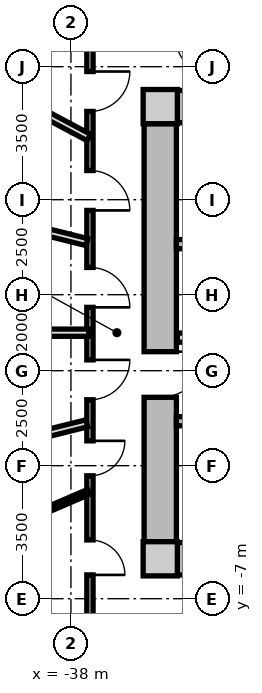
"""IFC4 building model, lengths in metres.
Left out: names, types, materials, properties, quantities, classifications, styles, units other than length and angle.
Written with IfcOpenShell. Run it as: python <this file> out.ifc"""

import sys

from ifc_helpers import new_model, si_unit, direction, frame, frame_2d, origin, origin_2d, place, context, subcontext, project, spatial, rectangle, extrude, source, transform, mapped, element, fill, save


model = new_model("IFC4")
c1 = context("Model", 3, precision=1e-05, world=origin(), true_north=direction((0.0, 1.0)))
c2 = subcontext(c1, "Body", "Model", "MODEL_VIEW")
j1 = project(units=[si_unit("LENGTHUNIT", "METRE"), si_unit("PLANEANGLEUNIT", "RADIAN")], contexts=[c1])
p1 = place(None, origin())
s1 = spatial("IfcSite", under=j1, at=p1, CompositionType="ELEMENT")
p2 = place(p1, origin())
s2 = spatial("IfcBuilding", under=s1, at=p2, CompositionType="ELEMENT")
p3 = place(p2, frame((0.0, 0.0, 36.85)))
s3 = spatial("IfcBuildingStorey", under=s2, at=p3, CompositionType="ELEMENT", Elevation=36.85)
m1 = source(origin(), c2, "Body", "SweptSolid", [
    extrude(rectangle(XDim=0.9, YDim=0.9, at=origin_2d()), origin(), (0.0, 0.0, 1.0), 3.05),
])
for number, where, z_axis, x_axis in (
    (1, (-35.65, -5.95, 0.0), (0.0, 0.0, 1.0), (1.0, 0.0, 0.0)),
    (2, (-35.65, 5.95, 0.0), (0.0, 0.0, 1.0), (1.0, 0.0, 0.0)),
):
    element("IfcColumn", number, at=place(p3, frame(where, z_axis=z_axis, x_axis=x_axis)), inside=s3, PredefinedType="COLUMN", context=c2, shape_type="MappedRepresentation", body=[
        mapped(m1, transform((0.0, 0.0, 0.0), x_axis=(1.0, 0.0, 0.0), y_axis=(0.0, 1.0, 0.0), z_axis=(0.0, 0.0, 1.0), scale=1.0)),
    ])
m2 = source(origin(), c2, "Body", "SweptSolid", [
    extrude(rectangle(XDim=14.4, YDim=0.85, at=frame_2d((7.2, 0.0))), origin(), (0.0, 0.0, 1.0), 2.79),
])
for number, where, z_axis, x_axis in (
    (3, (-35.2, 5.95, 0.0), (0.0, 0.0, 1.0), (1.0, 0.0, 0.0)),
    (4, (-20.8, -5.95, 0.0), (0.0, 0.0, 1.0), (-1.0, 0.0, 0.0)),
):
    element("IfcWall", number, at=place(p3, frame(where, z_axis=z_axis, x_axis=x_axis)), inside=s3, PredefinedType="SHEAR", context=c2, shape_type="MappedRepresentation", body=[
        mapped(m2, transform((0.0, 0.0, 0.0), x_axis=(1.0, 0.0, 0.0), y_axis=(0.0, 1.0, 0.0), z_axis=(0.0, 0.0, 1.0), scale=1.0)),
    ])
m3 = source(origin(), c2, "Body", "SweptSolid", [
    extrude(rectangle(XDim=11.0, YDim=0.85, at=frame_2d((5.5, 0.0))), origin(), (0.0, 0.0, 1.0), 2.79),
])
p4 = place(p3, frame((-35.65, -5.5, 0.0), z_axis=(0.0, 0.0, 1.0), x_axis=(0.0, 1.0, 0.0)))
e5 = element("IfcWall", 5, at=p4, inside=s3, PredefinedType="SHEAR", context=c2, shape_type="MappedRepresentation", body=[
    mapped(m3, transform((0.0, 0.0, 0.0), x_axis=(1.0, 0.0, 0.0), y_axis=(0.0, 1.0, 0.0), z_axis=(0.0, 0.0, 1.0), scale=1.0)),
])
p5 = place(p4, frame((3.8, 0.0, 0.0)))
e6 = element("IfcOpeningElement", 6, at=p5, cuts=e5, PredefinedType="OPENING", context=c2, shape_type="SweptSolid", body=[
    extrude(rectangle(XDim=1.2, YDim=2.15, at=frame_2d((0.6, 1.075))), frame((0.0, 0.435, 0.0), z_axis=(0.0, -1.0, 0.0), x_axis=(1.0, 0.0, 0.0)), (0.0, 0.0, 1.0), 0.87),
])
m4 = source(origin(), c2, "Body", "SweptSolid", [
    extrude(rectangle(XDim=7.765, YDim=0.24, at=frame_2d((3.883, 0.0))), origin(), (0.0, 0.0, 1.0), 2.79),
])
p6 = place(p3, frame((-35.225, 2.33, 0.0), z_axis=(0.0, 0.0, 1.0), x_axis=(1.0, 0.0, 0.0)))
e7 = element("IfcWall", 7, at=p6, inside=s3, PredefinedType="PARTITIONING", context=c2, shape_type="MappedRepresentation", body=[
    mapped(m4, transform((0.0, 0.0, 0.0), x_axis=(1.0, 0.0, 0.0), y_axis=(0.0, 1.0, 0.0), z_axis=(0.0, 0.0, 1.0), scale=1.0)),
])
p7 = place(p3, frame((-35.225, -2.33, 0.0), z_axis=(0.0, 0.0, 1.0), x_axis=(1.0, 0.0, 0.0)))
e8 = element("IfcWall", 8, at=p7, inside=s3, PredefinedType="PARTITIONING", context=c2, shape_type="MappedRepresentation", body=[
    mapped(m4, transform((0.0, 0.0, 0.0), x_axis=(1.0, 0.0, 0.0), y_axis=(0.0, 1.0, 0.0), z_axis=(0.0, 0.0, 1.0), scale=1.0)),
])
p8 = place(p7, frame((0.885, 0.0, 0.0)))
e9 = element("IfcOpeningElement", 9, at=p8, cuts=e8, PredefinedType="OPENING", context=c2, shape_type="SweptSolid", body=[
    extrude(rectangle(XDim=1.1, YDim=2.15, at=frame_2d((0.55, 1.075))), frame((0.0, 0.13, 0.0), z_axis=(0.0, -1.0, 0.0), x_axis=(1.0, 0.0, 0.0)), (0.0, 0.0, 1.0), 0.26),
])
m5 = source(origin(), c2, "Body", "SweptSolid", [
    extrude(rectangle(XDim=7.62, YDim=0.24, at=frame_2d((3.81, 0.0))), origin(), (0.0, 0.0, 1.0), 2.775),
])
p9 = place(p3, frame((-35.2, -0.13, 0.0), z_axis=(0.0, 0.0, 1.0), x_axis=(1.0, 0.0, 0.0)))
e10 = element("IfcWall", 10, at=p9, inside=s3, PredefinedType="PARTITIONING", context=c2, shape_type="MappedRepresentation", body=[
    mapped(m5, transform((0.0, 0.0, 0.0), x_axis=(1.0, 0.0, 0.0), y_axis=(0.0, 1.0, 0.0), z_axis=(0.0, 0.0, 1.0), scale=1.0)),
])
p10 = place(p9, frame((6.22, 0.0, 0.0)))
e11 = element("IfcOpeningElement", 11, at=p10, cuts=e10, PredefinedType="OPENING", context=c2, shape_type="SweptSolid", body=[
    extrude(rectangle(XDim=1.0, YDim=2.1, at=frame_2d((0.5, 1.05))), frame((0.0, 0.13, 0.0), z_axis=(0.0, -1.0, 0.0), x_axis=(1.0, 0.0, 0.0)), (0.0, 0.0, 1.0), 0.26),
])
p11 = place(p9, frame((0.85, 0.0, 0.0)))
e12 = element("IfcOpeningElement", 12, at=p11, cuts=e10, PredefinedType="OPENING", context=c2, shape_type="SweptSolid", body=[
    extrude(rectangle(XDim=1.1, YDim=2.2, at=frame_2d((0.55, 1.1))), frame((0.0, 0.13, 0.0), z_axis=(0.0, -1.0, 0.0), x_axis=(1.0, 0.0, 0.0)), (0.0, 0.0, 1.0), 0.26),
])
p12 = place(p9, frame((3.85, 0.0, 0.0)))
e13 = element("IfcOpeningElement", 13, at=p12, cuts=e10, PredefinedType="OPENING", context=c2, shape_type="SweptSolid", body=[
    extrude(rectangle(XDim=1.1, YDim=2.2, at=frame_2d((0.55, 1.1))), frame((0.0, 0.13, 0.0), z_axis=(0.0, -1.0, 0.0), x_axis=(1.0, 0.0, 0.0)), (0.0, 0.0, 1.0), 0.26),
])
m6 = source(origin(), c2, "Body", "SweptSolid", [
    extrude(rectangle(XDim=15.6, YDim=0.165, at=frame_2d((7.8, 0.0))), origin(), (0.0, 0.0, 1.0), 2.775),
])
p13 = place(p3, frame((-37.5, -7.8, 0.0), z_axis=(0.0, 0.0, 1.0), x_axis=(0.0, 1.0, 0.0)))
e14 = element("IfcWall", 14, at=p13, inside=s3, PredefinedType="PARTITIONING", context=c2, shape_type="MappedRepresentation", body=[
    mapped(m6, transform((0.0, 0.0, 0.0), x_axis=(1.0, 0.0, 0.0), y_axis=(0.0, 1.0, 0.0), z_axis=(0.0, 0.0, 1.0), scale=1.0)),
])
p14 = place(p13, frame((13.623, 0.0, 0.0)))
e15 = element("IfcOpeningElement", 15, at=p14, cuts=e14, PredefinedType="OPENING", context=c2, shape_type="SweptSolid", body=[
    extrude(rectangle(XDim=1.05, YDim=2.15, at=frame_2d((0.525, 1.075))), frame((0.0, 0.093, 0.0), z_axis=(0.0, -1.0, 0.0), x_axis=(1.0, 0.0, 0.0)), (0.0, 0.0, 1.0), 0.185),
])
p15 = place(p13, frame((11.018, 0.0, 0.0)))
e16 = element("IfcOpeningElement", 16, at=p15, cuts=e14, PredefinedType="OPENING", context=c2, shape_type="SweptSolid", body=[
    extrude(rectangle(XDim=1.05, YDim=2.15, at=frame_2d((0.525, 1.075))), frame((0.0, 0.093, 0.0), z_axis=(0.0, -1.0, 0.0), x_axis=(1.0, 0.0, 0.0)), (0.0, 0.0, 1.0), 0.185),
])
p16 = place(p13, frame((8.467, 0.0, 0.0)))
e17 = element("IfcOpeningElement", 17, at=p16, cuts=e14, PredefinedType="OPENING", context=c2, shape_type="SweptSolid", body=[
    extrude(rectangle(XDim=1.05, YDim=2.15, at=frame_2d((0.525, 1.075))), frame((0.0, 0.093, 0.0), z_axis=(0.0, -1.0, 0.0), x_axis=(1.0, 0.0, 0.0)), (0.0, 0.0, 1.0), 0.185),
])
p17 = place(p13, frame((6.035, 0.0, 0.0)))
e18 = element("IfcOpeningElement", 18, at=p17, cuts=e14, PredefinedType="OPENING", context=c2, shape_type="SweptSolid", body=[
    extrude(rectangle(XDim=1.05, YDim=2.15, at=frame_2d((0.525, 1.075))), frame((0.0, 0.093, 0.0), z_axis=(0.0, -1.0, 0.0), x_axis=(1.0, 0.0, 0.0)), (0.0, 0.0, 1.0), 0.185),
])
p18 = place(p13, frame((4.034, 0.0, 0.0)))
e19 = element("IfcOpeningElement", 19, at=p18, cuts=e14, PredefinedType="OPENING", context=c2, shape_type="SweptSolid", body=[
    extrude(rectangle(XDim=0.92, YDim=2.1, at=frame_2d((0.46, 1.05))), frame((0.0, 0.093, 0.0), z_axis=(0.0, -1.0, 0.0), x_axis=(1.0, 0.0, 0.0)), (0.0, 0.0, 1.0), 0.185),
])
p19 = place(p13, frame((1.426, 0.0, 0.0)))
e20 = element("IfcOpeningElement", 20, at=p19, cuts=e14, PredefinedType="OPENING", context=c2, shape_type="SweptSolid", body=[
    extrude(rectangle(XDim=0.92, YDim=2.1, at=frame_2d((0.46, 1.05))), frame((0.0, 0.093, 0.0), z_axis=(0.0, -1.0, 0.0), x_axis=(1.0, 0.0, 0.0)), (0.0, 0.0, 1.0), 0.185),
])
m7 = source(origin(), c2, "Body", "SweptSolid", [
    extrude(rectangle(XDim=9.737, YDim=0.19, at=frame_2d((4.869, 0.0))), origin(), (0.0, 0.0, 1.0), 2.225),
])
p20 = place(p3, frame((-37.58, 2.385, 0.0), z_axis=(0.0, 0.0, 1.0), x_axis=(-0.970392716238, 0.241532557375, 0.0)))
e21 = element("IfcWall", 21, at=p20, inside=s3, PredefinedType="PARTITIONING", context=c2, shape_type="MappedRepresentation", body=[
    mapped(m7, transform((0.0, 0.0, 0.0), x_axis=(1.0, 0.0, 0.0), y_axis=(0.0, 1.0, 0.0), z_axis=(0.0, 0.0, 1.0), scale=1.0)),
])
m8 = source(origin(), c2, "Body", "SweptSolid", [
    extrude(rectangle(XDim=7.873, YDim=0.19, at=frame_2d((3.937, 0.0))), origin(), (0.0, 0.0, 1.0), 2.775),
])
p21 = place(p3, frame((-37.53, 5.138, 0.0), z_axis=(0.0, 0.0, 1.0), x_axis=(-0.882666052726, 0.470000680175, 0.0)))
e22 = element("IfcWall", 22, at=p21, inside=s3, PredefinedType="PARTITIONING", context=c2, shape_type="MappedRepresentation", body=[
    mapped(m8, transform((0.0, 0.0, 0.0), x_axis=(1.0, 0.0, 0.0), y_axis=(0.0, 1.0, 0.0), z_axis=(0.0, 0.0, 1.0), scale=1.0)),
])
p22 = place(p3, frame((-37.58, -2.385, 0.0), z_axis=(0.0, 0.0, 1.0), x_axis=(-0.970392716238, -0.241532557375, 0.0)))
e23 = element("IfcWall", 23, at=p22, inside=s3, PredefinedType="PARTITIONING", context=c2, shape_type="MappedRepresentation", body=[
    mapped(m7, transform((0.0, 0.0, 0.0), x_axis=(1.0, 0.0, 0.0), y_axis=(0.0, 1.0, 0.0), z_axis=(0.0, 0.0, 1.0), scale=1.0)),
])
m9 = source(origin(), c2, "Body", "SweptSolid", [
    extrude(rectangle(XDim=9.499, YDim=0.19, at=frame_2d((4.75, 0.0))), origin(), (0.0, 0.0, 1.0), 2.775),
])
p23 = place(p3, frame((-37.53, 0.0, 0.0), z_axis=(0.0, 0.0, 1.0), x_axis=(-1.0, 0.0, 0.0)))
e24 = element("IfcWall", 24, at=p23, inside=s3, PredefinedType="PARTITIONING", context=c2, shape_type="MappedRepresentation", body=[
    mapped(m9, transform((0.0, 0.0, 0.0), x_axis=(1.0, 0.0, 0.0), y_axis=(0.0, 1.0, 0.0), z_axis=(0.0, 0.0, 1.0), scale=1.0)),
])
m10 = source(origin(), c2, "Body", "SweptSolid", [
    extrude(rectangle(XDim=8.452, YDim=0.14, at=frame_2d((4.226, 0.0))), origin(), (0.0, 0.0, 1.0), 2.775),
])
p24 = place(p3, frame((-37.53, -4.188, 0.0), z_axis=(0.0, 0.0, 1.0), x_axis=(-0.918706709896, -0.394940478036, 0.0)))
e25 = element("IfcWall", 25, at=p24, inside=s3, PredefinedType="PARTITIONING", context=c2, shape_type="MappedRepresentation", body=[
    mapped(m10, transform((0.0, 0.0, 0.0), x_axis=(1.0, 0.0, 0.0), y_axis=(0.0, 1.0, 0.0), z_axis=(0.0, 0.0, 1.0), scale=1.0)),
])
m11 = source(origin(), c2, "Body", "SweptSolid", [
    extrude(rectangle(XDim=1.2, YDim=2.15, at=frame_2d((0.6, 1.075))), frame((0.0, 0.025, 0.0), z_axis=(0.0, -1.0, 0.0), x_axis=(1.0, 0.0, 0.0)), (0.0, 0.0, 1.0), 0.05),
])
p25 = place(p5, frame((1.2, 0.0, 0.0), z_axis=(0.0, 0.0, 1.0), x_axis=(-1.0, 0.0, 0.0)))
e26 = element("IfcDoor", 26, at=p25, inside=s3, OperationType="SINGLE_SWING_LEFT", PredefinedType="DOOR", context=c2, shape_type="MappedRepresentation", body=[
    mapped(m11, transform((0.0, 0.0, 0.0), x_axis=(1.0, 0.0, 0.0), y_axis=(0.0, 1.0, 0.0), z_axis=(0.0, 0.0, 1.0), scale=1.0)),
])
fill(e6, e26)
m12 = source(origin(), c2, "Body", "SweptSolid", [
    extrude(rectangle(XDim=1.05, YDim=2.15, at=frame_2d((0.525, 1.075))), frame((0.0, 0.025, 0.0), z_axis=(0.0, -1.0, 0.0), x_axis=(1.0, 0.0, 0.0)), (0.0, 0.0, 1.0), 0.05),
])
p26 = place(p14, frame((1.05, 0.0, 0.0), z_axis=(0.0, 0.0, 1.0), x_axis=(-1.0, 0.0, 0.0)))
e27 = element("IfcDoor", 27, at=p26, inside=s3, OperationType="SINGLE_SWING_LEFT", PredefinedType="DOOR", context=c2, shape_type="MappedRepresentation", body=[
    mapped(m12, transform((0.0, 0.0, 0.0), x_axis=(1.0, 0.0, 0.0), y_axis=(0.0, 1.0, 0.0), z_axis=(0.0, 0.0, 1.0), scale=1.0)),
])
fill(e15, e27)
p27 = place(p15, frame((1.05, 0.0, 0.0), z_axis=(0.0, 0.0, 1.0), x_axis=(-1.0, 0.0, 0.0)))
e28 = element("IfcDoor", 28, at=p27, inside=s3, OperationType="SINGLE_SWING_RIGHT", PredefinedType="DOOR", context=c2, shape_type="MappedRepresentation", body=[
    mapped(m12, transform((0.0, 0.0, 0.0), x_axis=(1.0, 0.0, 0.0), y_axis=(0.0, 1.0, 0.0), z_axis=(0.0, 0.0, 1.0), scale=1.0)),
])
fill(e16, e28)
p28 = place(p16, frame((1.05, 0.0, 0.0), z_axis=(0.0, 0.0, 1.0), x_axis=(-1.0, 0.0, 0.0)))
e29 = element("IfcDoor", 29, at=p28, inside=s3, OperationType="SINGLE_SWING_RIGHT", PredefinedType="DOOR", context=c2, shape_type="MappedRepresentation", body=[
    mapped(m12, transform((0.0, 0.0, 0.0), x_axis=(1.0, 0.0, 0.0), y_axis=(0.0, 1.0, 0.0), z_axis=(0.0, 0.0, 1.0), scale=1.0)),
])
fill(e17, e29)
p29 = place(p17, frame((1.05, 0.0, 0.0), z_axis=(0.0, 0.0, 1.0), x_axis=(-1.0, 0.0, 0.0)))
e30 = element("IfcDoor", 30, at=p29, inside=s3, OperationType="SINGLE_SWING_LEFT", PredefinedType="DOOR", context=c2, shape_type="MappedRepresentation", body=[
    mapped(m12, transform((0.0, 0.0, 0.0), x_axis=(1.0, 0.0, 0.0), y_axis=(0.0, 1.0, 0.0), z_axis=(0.0, 0.0, 1.0), scale=1.0)),
])
fill(e18, e30)
m13 = source(origin(), c2, "Body", "SweptSolid", [
    extrude(rectangle(XDim=0.92, YDim=2.1, at=frame_2d((0.46, 1.05))), frame((0.0, 0.025, 0.0), z_axis=(0.0, -1.0, 0.0), x_axis=(1.0, 0.0, 0.0)), (0.0, 0.0, 1.0), 0.05),
])
p30 = place(p18, frame((0.92, 0.0, 0.0), z_axis=(0.0, 0.0, 1.0), x_axis=(-1.0, 0.0, 0.0)))
e31 = element("IfcDoor", 31, at=p30, inside=s3, OperationType="SINGLE_SWING_LEFT", PredefinedType="DOOR", context=c2, shape_type="MappedRepresentation", body=[
    mapped(m13, transform((0.0, 0.0, 0.0), x_axis=(1.0, 0.0, 0.0), y_axis=(0.0, 1.0, 0.0), z_axis=(0.0, 0.0, 1.0), scale=1.0)),
])
fill(e19, e31)
p31 = place(p19, frame((0.92, 0.0, 0.0), z_axis=(0.0, 0.0, 1.0), x_axis=(-1.0, 0.0, 0.0)))
e32 = element("IfcDoor", 32, at=p31, inside=s3, OperationType="SINGLE_SWING_RIGHT", PredefinedType="DOOR", context=c2, shape_type="MappedRepresentation", body=[
    mapped(m13, transform((0.0, 0.0, 0.0), x_axis=(1.0, 0.0, 0.0), y_axis=(0.0, 1.0, 0.0), z_axis=(0.0, 0.0, 1.0), scale=1.0)),
])
fill(e20, e32)
save(model, sys.argv[1])
